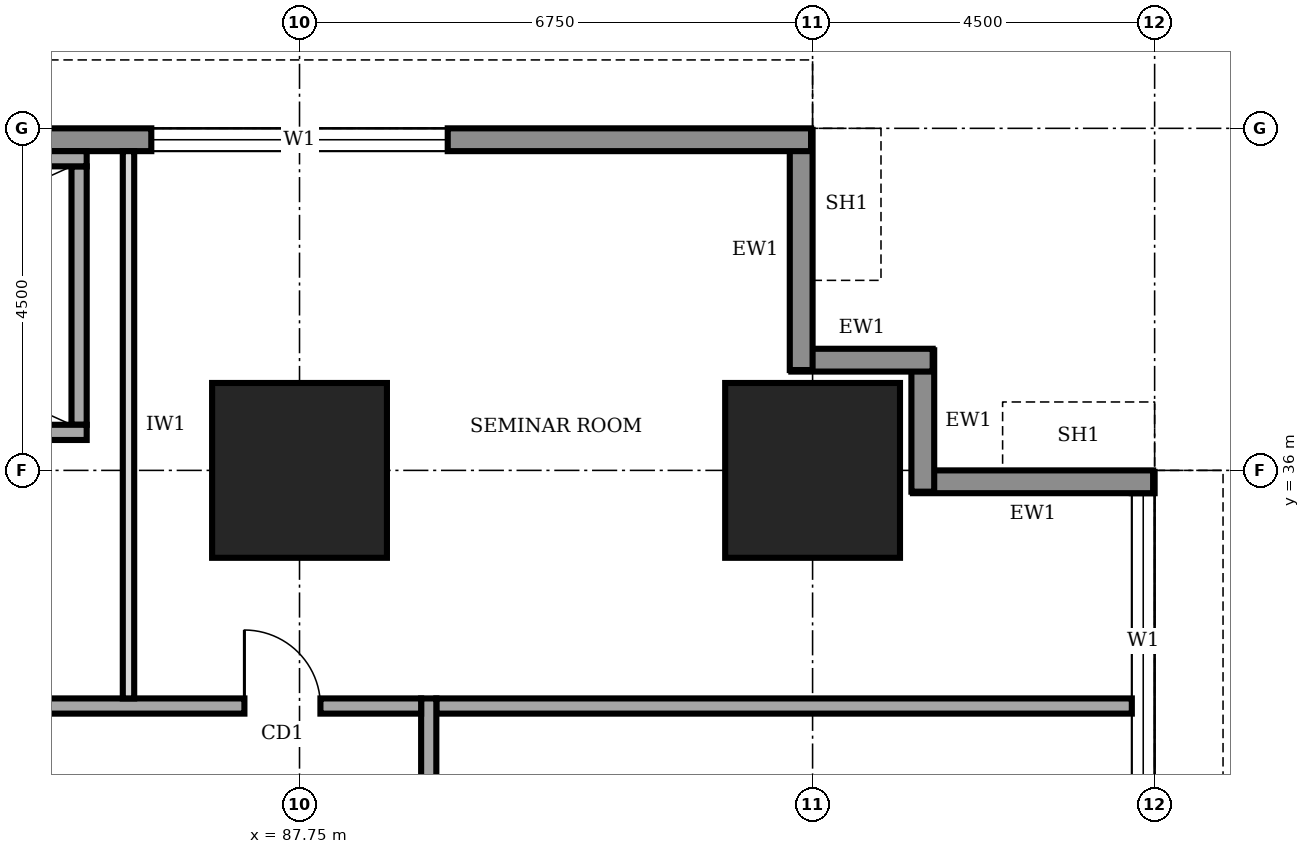
"""IFC4 building model, lengths in metres.
Left out: names, types, materials, properties, quantities, classifications, styles, units other than length and angle.
Written with IfcOpenShell. Run it as: python <this file> out.ifc"""

import sys

from ifc_helpers import new_model, si_unit, direction, frame, frame_2d, origin, origin_2d, place, context, subcontext, project, spatial, rectangle, extrude, element, fill, save


model = new_model("IFC4")
c1 = context("Model", 3, precision=1e-05, world=origin(), true_north=direction((0.0, 1.0)))
c2 = subcontext(c1, "Body", "Model", "MODEL_VIEW")
j1 = project(units=[si_unit("LENGTHUNIT", "METRE"), si_unit("PLANEANGLEUNIT", "RADIAN")], contexts=[c1])
p1 = place(None, origin())
s1 = spatial("IfcSite", under=j1, at=p1, CompositionType="ELEMENT")
p2 = place(p1, origin())
s2 = spatial("IfcBuilding", under=s1, at=p2, CompositionType="ELEMENT")
p3 = place(p2, frame((0.0, 0.0, 25.0)))
s3 = spatial("IfcBuildingStorey", under=s2, at=p3, CompositionType="ELEMENT", Elevation=25.0)
for number, where, z_axis, x_axis in (
    (1, (87.75, 36.0, 0.0), (0.0, 0.0, 1.0), (1.0, 0.0, 0.0)),
    (2, (94.5, 36.0, 0.0), (0.0, 0.0, 1.0), (1.0, 0.0, 0.0)),
):
    element("IfcColumn", number, at=place(p3, frame(where, z_axis=z_axis, x_axis=x_axis)), inside=s3, PredefinedType="COLUMN", context=c2, shape_type="SweptSolid", body=[
        extrude(rectangle(XDim=2.3, YDim=2.3, at=origin_2d()), origin(), (0.0, 0.0, 1.0), 4.0),
    ])
p4 = place(p3, frame((98.85, 4.52, 0.0), z_axis=(0.0, 0.0, 1.0), x_axis=(0.0, 1.0, 0.0)))
e3 = element("IfcWall", 3, at=p4, inside=s3, PredefinedType="STANDARD", context=c2, shape_type="SweptSolid", body=[
    extrude(rectangle(XDim=31.46, YDim=0.3, at=frame_2d((15.73, 0.0))), origin(), (0.0, 0.0, 1.0), 3.75),
])
p5 = place(p4, frame((4.78, 0.0, 0.9)))
e4 = element("IfcOpeningElement", 4, at=p5, cuts=e3, PredefinedType="OPENING", context=c2, shape_type="SweptSolid", body=[
    extrude(rectangle(XDim=3.9, YDim=2.2, at=frame_2d((1.95, 1.1))), frame((0.0, 0.16, 0.0), z_axis=(0.0, -1.0, 0.0), x_axis=(1.0, 0.0, 0.0)), (0.0, 0.0, 1.0), 0.32),
])
p6 = place(p4, frame((9.28, 0.0, 0.9)))
e5 = element("IfcOpeningElement", 5, at=p6, cuts=e3, PredefinedType="OPENING", context=c2, shape_type="SweptSolid", body=[
    extrude(rectangle(XDim=3.9, YDim=2.2, at=frame_2d((1.95, 1.1))), frame((0.0, 0.16, 0.0), z_axis=(0.0, -1.0, 0.0), x_axis=(1.0, 0.0, 0.0)), (0.0, 0.0, 1.0), 0.32),
])
p7 = place(p4, frame((13.78, 0.0, 0.9)))
e6 = element("IfcOpeningElement", 6, at=p7, cuts=e3, PredefinedType="OPENING", context=c2, shape_type="SweptSolid", body=[
    extrude(rectangle(XDim=3.9, YDim=2.2, at=frame_2d((1.95, 1.1))), frame((0.0, 0.16, 0.0), z_axis=(0.0, -1.0, 0.0), x_axis=(1.0, 0.0, 0.0)), (0.0, 0.0, 1.0), 0.32),
])
p8 = place(p4, frame((18.28, 0.0, 0.9)))
e7 = element("IfcOpeningElement", 7, at=p8, cuts=e3, PredefinedType="OPENING", context=c2, shape_type="SweptSolid", body=[
    extrude(rectangle(XDim=3.9, YDim=2.2, at=frame_2d((1.95, 1.1))), frame((0.0, 0.16, 0.0), z_axis=(0.0, -1.0, 0.0), x_axis=(1.0, 0.0, 0.0)), (0.0, 0.0, 1.0), 0.32),
])
p9 = place(p4, frame((22.78, 0.0, 0.9)))
e8 = element("IfcOpeningElement", 8, at=p9, cuts=e3, PredefinedType="OPENING", context=c2, shape_type="SweptSolid", body=[
    extrude(rectangle(XDim=3.9, YDim=2.2, at=frame_2d((1.95, 1.1))), frame((0.0, 0.16, 0.0), z_axis=(0.0, -1.0, 0.0), x_axis=(1.0, 0.0, 0.0)), (0.0, 0.0, 1.0), 0.32),
])
p10 = place(p4, frame((27.28, 0.0, 0.9)))
e9 = element("IfcOpeningElement", 9, at=p10, cuts=e3, PredefinedType="OPENING", context=c2, shape_type="SweptSolid", body=[
    extrude(rectangle(XDim=3.9, YDim=2.2, at=frame_2d((1.95, 1.1))), frame((0.0, 0.16, 0.0), z_axis=(0.0, -1.0, 0.0), x_axis=(1.0, 0.0, 0.0)), (0.0, 0.0, 1.0), 0.32),
])
p11 = place(p3, frame((98.98, 35.85, 0.0), z_axis=(0.0, 0.0, 1.0), x_axis=(-1.0, 0.0, 0.0)))
e10 = element("IfcWall", 10, at=p11, inside=s3, PredefinedType="STANDARD", context=c2, shape_type="SweptSolid", body=[
    extrude(rectangle(XDim=3.16, YDim=0.3, at=frame_2d((1.58, 0.0))), origin(), (0.0, 0.0, 1.0), 2.85),
])
for number, where, z_axis, x_axis in (
    (11, (95.95, 35.72, 0.0), (0.0, 0.0, 1.0), (0.0, 1.0, 0.0)),
    (12, (96.08, 37.45, 0.0), (0.0, 0.0, 1.0), (-1.0, 0.0, 0.0)),
):
    element("IfcWall", number, at=place(p3, frame(where, z_axis=z_axis, x_axis=x_axis)), inside=s3, PredefinedType="STANDARD", context=c2, shape_type="SweptSolid", body=[
        extrude(rectangle(XDim=1.86, YDim=0.3, at=frame_2d((0.93, 0.0))), origin(), (0.0, 0.0, 1.0), 3.75),
    ])
p12 = place(p3, frame((94.35, 37.32, 0.0), z_axis=(0.0, 0.0, 1.0), x_axis=(0.0, 1.0, 0.0)))
e13 = element("IfcWall", 13, at=p12, inside=s3, PredefinedType="STANDARD", context=c2, shape_type="SweptSolid", body=[
    extrude(rectangle(XDim=3.16, YDim=0.3, at=frame_2d((1.58, 0.0))), origin(), (0.0, 0.0, 1.0), 2.85),
])
p13 = place(p3, frame((94.48, 40.35, 0.0), z_axis=(0.0, 0.0, 1.0), x_axis=(-1.0, 0.0, 0.0)))
e14 = element("IfcWall", 14, at=p13, inside=s3, PredefinedType="STANDARD", context=c2, shape_type="SweptSolid", body=[
    extrude(rectangle(XDim=26.96, YDim=0.3, at=frame_2d((13.48, 0.0))), origin(), (0.0, 0.0, 1.0), 3.75),
])
p14 = place(p13, frame((22.78, 0.0, 0.9)))
e15 = element("IfcOpeningElement", 15, at=p14, cuts=e14, PredefinedType="OPENING", context=c2, shape_type="SweptSolid", body=[
    extrude(rectangle(XDim=3.9, YDim=2.2, at=frame_2d((1.95, 1.1))), frame((0.0, 0.16, 0.0), z_axis=(0.0, -1.0, 0.0), x_axis=(1.0, 0.0, 0.0)), (0.0, 0.0, 1.0), 0.32),
])
p15 = place(p13, frame((18.28, 0.0, 0.9)))
e16 = element("IfcOpeningElement", 16, at=p15, cuts=e14, PredefinedType="OPENING", context=c2, shape_type="SweptSolid", body=[
    extrude(rectangle(XDim=3.9, YDim=2.2, at=frame_2d((1.95, 1.1))), frame((0.0, 0.16, 0.0), z_axis=(0.0, -1.0, 0.0), x_axis=(1.0, 0.0, 0.0)), (0.0, 0.0, 1.0), 0.32),
])
p16 = place(p13, frame((4.78, 0.0, 0.9)))
e17 = element("IfcOpeningElement", 17, at=p16, cuts=e14, PredefinedType="OPENING", context=c2, shape_type="SweptSolid", body=[
    extrude(rectangle(XDim=3.9, YDim=2.2, at=frame_2d((1.95, 1.1))), frame((0.0, 0.16, 0.0), z_axis=(0.0, -1.0, 0.0), x_axis=(1.0, 0.0, 0.0)), (0.0, 0.0, 1.0), 0.32),
])
p17 = place(p3, frame((89.45, 9.2, 0.0), z_axis=(0.0, 0.0, 1.0), x_axis=(0.0, 1.0, 0.0)))
e18 = element("IfcWall", 18, at=p17, inside=s3, PredefinedType="SOLIDWALL", context=c2, shape_type="SweptSolid", body=[
    extrude(rectangle(XDim=23.8, YDim=0.2, at=frame_2d((11.9, 0.0))), origin(), (0.0, 0.0, 1.0), 3.75),
])
p18 = place(p17, frame((1.55, 0.0, 0.0)))
e19 = element("IfcOpeningElement", 19, at=p18, cuts=e18, PredefinedType="OPENING", context=c2, shape_type="SweptSolid", body=[
    extrude(rectangle(XDim=1.0, YDim=2.1, at=frame_2d((0.5, 1.05))), frame((0.0, 0.11, 0.0), z_axis=(0.0, -1.0, 0.0), x_axis=(1.0, 0.0, 0.0)), (0.0, 0.0, 1.0), 0.22),
])
p19 = place(p17, frame((5.75, 0.0, 0.0)))
e20 = element("IfcOpeningElement", 20, at=p19, cuts=e18, PredefinedType="OPENING", context=c2, shape_type="SweptSolid", body=[
    extrude(rectangle(XDim=0.9, YDim=2.1, at=frame_2d((0.45, 1.05))), frame((0.0, 0.11, 0.0), z_axis=(0.0, -1.0, 0.0), x_axis=(1.0, 0.0, 0.0)), (0.0, 0.0, 1.0), 0.22),
])
p20 = place(p17, frame((8.75, 0.0, 0.0)))
e21 = element("IfcOpeningElement", 21, at=p20, cuts=e18, PredefinedType="OPENING", context=c2, shape_type="SweptSolid", body=[
    extrude(rectangle(XDim=0.9, YDim=2.1, at=frame_2d((0.45, 1.05))), frame((0.0, 0.11, 0.0), z_axis=(0.0, -1.0, 0.0), x_axis=(1.0, 0.0, 0.0)), (0.0, 0.0, 1.0), 0.22),
])
p21 = place(p17, frame((13.6, 0.0, 0.0)))
e22 = element("IfcOpeningElement", 22, at=p21, cuts=e18, PredefinedType="OPENING", context=c2, shape_type="SweptSolid", body=[
    extrude(rectangle(XDim=0.9, YDim=2.1, at=frame_2d((0.45, 1.05))), frame((0.0, 0.11, 0.0), z_axis=(0.0, -1.0, 0.0), x_axis=(1.0, 0.0, 0.0)), (0.0, 0.0, 1.0), 0.22),
])
p22 = place(p17, frame((16.3, 0.0, 0.0)))
e23 = element("IfcOpeningElement", 23, at=p22, cuts=e18, PredefinedType="OPENING", context=c2, shape_type="SweptSolid", body=[
    extrude(rectangle(XDim=1.0, YDim=2.1, at=frame_2d((0.5, 1.05))), frame((0.0, 0.11, 0.0), z_axis=(0.0, -1.0, 0.0), x_axis=(1.0, 0.0, 0.0)), (0.0, 0.0, 1.0), 0.22),
])
p23 = place(p17, frame((10.8, 0.0, 0.0)))
e24 = element("IfcOpeningElement", 24, at=p23, cuts=e18, PredefinedType="OPENING", context=c2, shape_type="SweptSolid", body=[
    extrude(rectangle(XDim=1.0, YDim=2.1, at=frame_2d((0.5, 1.05))), frame((0.0, 0.11, 0.0), z_axis=(0.0, -1.0, 0.0), x_axis=(1.0, 0.0, 0.0)), (0.0, 0.0, 1.0), 0.22),
])
p24 = place(p17, frame((20.3, 0.0, 0.0)))
e25 = element("IfcOpeningElement", 25, at=p24, cuts=e18, PredefinedType="OPENING", context=c2, shape_type="SweptSolid", body=[
    extrude(rectangle(XDim=1.0, YDim=2.1, at=frame_2d((0.5, 1.05))), frame((0.0, 0.11, 0.0), z_axis=(0.0, -1.0, 0.0), x_axis=(1.0, 0.0, 0.0)), (0.0, 0.0, 1.0), 0.22),
])
p25 = place(p3, frame((89.35, 32.9, 0.0), z_axis=(0.0, 0.0, 1.0), x_axis=(-1.0, 0.0, 0.0)))
e26 = element("IfcWall", 26, at=p25, inside=s3, PredefinedType="SOLIDWALL", context=c2, shape_type="SweptSolid", body=[
    extrude(rectangle(XDim=16.9, YDim=0.2, at=frame_2d((8.45, 0.0))), origin(), (0.0, 0.0, 1.0), 3.75),
])
p26 = place(p25, frame((14.375, 0.0, 0.0)))
e27 = element("IfcOpeningElement", 27, at=p26, cuts=e26, PredefinedType="OPENING", context=c2, shape_type="SweptSolid", body=[
    extrude(rectangle(XDim=1.0, YDim=2.1, at=frame_2d((0.5, 1.05))), frame((0.0, 0.11, 0.0), z_axis=(0.0, -1.0, 0.0), x_axis=(1.0, 0.0, 0.0)), (0.0, 0.0, 1.0), 0.22),
])
p27 = place(p25, frame((7.85, 0.0, 0.0)))
e28 = element("IfcOpeningElement", 28, at=p27, cuts=e26, PredefinedType="OPENING", context=c2, shape_type="SweptSolid", body=[
    extrude(rectangle(XDim=1.0, YDim=2.1, at=frame_2d((0.5, 1.05))), frame((0.0, 0.11, 0.0), z_axis=(0.0, -1.0, 0.0), x_axis=(1.0, 0.0, 0.0)), (0.0, 0.0, 1.0), 0.22),
])
p28 = place(p25, frame((1.325, 0.0, 0.0)))
e29 = element("IfcOpeningElement", 29, at=p28, cuts=e26, PredefinedType="OPENING", context=c2, shape_type="SweptSolid", body=[
    extrude(rectangle(XDim=1.0, YDim=2.1, at=frame_2d((0.5, 1.05))), frame((0.0, 0.11, 0.0), z_axis=(0.0, -1.0, 0.0), x_axis=(1.0, 0.0, 0.0)), (0.0, 0.0, 1.0), 0.22),
])
p29 = place(p3, frame((89.55, 32.9, 0.0), z_axis=(0.0, 0.0, 1.0), x_axis=(1.0, 0.0, 0.0)))
e30 = element("IfcWall", 30, at=p29, inside=s3, PredefinedType="SOLIDWALL", context=c2, shape_type="SweptSolid", body=[
    extrude(rectangle(XDim=9.15, YDim=0.2, at=frame_2d((4.575, 0.0))), origin(), (0.0, 0.0, 1.0), 3.75),
])
p30 = place(p3, frame((85.5, 33.0, 0.0), z_axis=(0.0, 0.0, 1.0), x_axis=(0.0, 1.0, 0.0)))
e31 = element("IfcWall", 31, at=p30, inside=s3, PredefinedType="PARTITIONING", context=c2, shape_type="SweptSolid", body=[
    extrude(rectangle(XDim=7.2, YDim=0.15, at=frame_2d((3.6, 0.0))), origin(), (0.0, 0.0, 1.0), 3.75),
])
p31 = place(p3, frame((77.05, 36.5, 0.0), z_axis=(0.0, 0.0, 1.0), x_axis=(1.0, 0.0, 0.0)))
e32 = element("IfcWall", 32, at=p31, inside=s3, PredefinedType="SOLIDWALL", context=c2, shape_type="SweptSolid", body=[
    extrude(rectangle(XDim=7.9, YDim=0.2, at=frame_2d((3.95, 0.0))), origin(), (0.0, 0.0, 1.0), 3.75),
])
p32 = place(p31, frame((6.3, 0.0, 0.0)))
e33 = element("IfcOpeningElement", 33, at=p32, cuts=e32, PredefinedType="OPENING", context=c2, shape_type="SweptSolid", body=[
    extrude(rectangle(XDim=1.0, YDim=2.1, at=frame_2d((0.5, 1.05))), frame((0.0, 0.11, 0.0), z_axis=(0.0, -1.0, 0.0), x_axis=(1.0, 0.0, 0.0)), (0.0, 0.0, 1.0), 0.22),
])
p33 = place(p3, frame((77.05, 40.1, 0.0), z_axis=(0.0, 0.0, 1.0), x_axis=(1.0, 0.0, 0.0)))
e34 = element("IfcWall", 34, at=p33, inside=s3, PredefinedType="SOLIDWALL", context=c2, shape_type="SweptSolid", body=[
    extrude(rectangle(XDim=7.9, YDim=0.2, at=frame_2d((3.95, 0.0))), origin(), (0.0, 0.0, 1.0), 3.75),
])
p34 = place(p3, frame((84.85, 36.6, 0.0), z_axis=(0.0, 0.0, 1.0), x_axis=(0.0, 1.0, 0.0)))
e35 = element("IfcWall", 35, at=p34, inside=s3, PredefinedType="SOLIDWALL", context=c2, shape_type="SweptSolid", body=[
    extrude(rectangle(XDim=3.4, YDim=0.2, at=frame_2d((1.7, 0.0))), origin(), (0.0, 0.0, 1.0), 3.75),
])
p35 = place(p10, origin())
e36 = element("IfcWindow", 36, at=p35, inside=s3, PartitioningType="SINGLE_PANEL", PredefinedType="WINDOW", context=c2, shape_type="SweptSolid", body=[
    extrude(rectangle(XDim=3.9, YDim=2.2, at=frame_2d((1.95, 1.1))), frame((0.0, 0.03, 0.0), z_axis=(0.0, -1.0, 0.0), x_axis=(1.0, 0.0, 0.0)), (0.0, 0.0, 1.0), 0.06),
])
fill(e9, e36)
p36 = place(p16, origin())
e37 = element("IfcWindow", 37, at=p36, inside=s3, PartitioningType="SINGLE_PANEL", PredefinedType="WINDOW", context=c2, shape_type="SweptSolid", body=[
    extrude(rectangle(XDim=3.9, YDim=2.2, at=frame_2d((1.95, 1.1))), frame((0.0, 0.03, 0.0), z_axis=(0.0, -1.0, 0.0), x_axis=(1.0, 0.0, 0.0)), (0.0, 0.0, 1.0), 0.06),
])
fill(e17, e37)
p37 = place(p28, frame((1.0, 0.0, 0.0), z_axis=(0.0, 0.0, 1.0), x_axis=(-1.0, 0.0, 0.0)))
e38 = element("IfcDoor", 38, at=p37, inside=s3, OperationType="SINGLE_SWING_LEFT", PredefinedType="DOOR", context=c2, shape_type="SweptSolid", body=[
    extrude(rectangle(XDim=1.0, YDim=2.1, at=frame_2d((0.5, 1.05))), frame((0.0, 0.025, 0.0), z_axis=(0.0, -1.0, 0.0), x_axis=(1.0, 0.0, 0.0)), (0.0, 0.0, 1.0), 0.05),
])
fill(e29, e38)
save(model, sys.argv[1])
